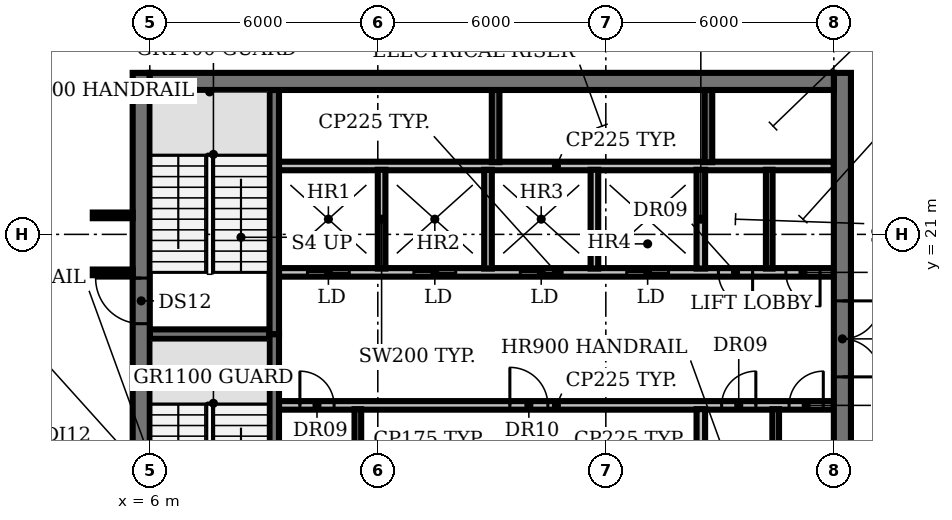
"""IFC4 building model, lengths in metres.
Left out: names, types, materials, properties, quantities, classifications, styles, units other than length and angle.
Written with IfcOpenShell. Run it as: python <this file> out.ifc"""

import sys

from ifc_helpers import new_model, si_unit, direction, frame, frame_2d, origin, place, context, subcontext, project, spatial, rectangle, extrude, element, fill, save


model = new_model("IFC4")
c1 = context("Model", 3, precision=1e-05, world=origin(), true_north=direction((0.0, 1.0)))
c2 = subcontext(c1, "Body", "Model", "MODEL_VIEW")
j1 = project(units=[si_unit("LENGTHUNIT", "METRE"), si_unit("PLANEANGLEUNIT", "RADIAN")], contexts=[c1])
p1 = place(None, origin())
s1 = spatial("IfcSite", under=j1, at=p1, CompositionType="ELEMENT")
p2 = place(p1, origin())
s2 = spatial("IfcBuilding", under=s1, at=p2, CompositionType="ELEMENT")
p3 = place(p2, frame((0.0, 0.0, 209.6)))
s3 = spatial("IfcBuildingStorey", under=s2, at=p3, CompositionType="ELEMENT", Elevation=209.6)
p4 = place(p3, frame((9.4, 16.5, 0.0), z_axis=(0.0, 0.0, 1.0), x_axis=(1.0, 0.0, 0.0)))
e1 = element("IfcWall", 1, at=p4, inside=s3, PredefinedType="PARTITIONING", context=c2, shape_type="SweptSolid", body=[
    extrude(rectangle(XDim=14.6, YDim=0.225, at=frame_2d((7.3, 0.0))), origin(), (0.0, 0.0, 1.0), 3.8),
])
p5 = place(p4, frame((0.55, 0.0, 0.0)))
e2 = element("IfcOpeningElement", 2, at=p5, cuts=e1, PredefinedType="OPENING", context=c2, shape_type="SweptSolid", body=[
    extrude(rectangle(XDim=0.9, YDim=2.1, at=frame_2d((0.45, 1.05))), frame((0.0, 0.123, 0.0), z_axis=(0.0, -1.0, 0.0), x_axis=(1.0, 0.0, 0.0)), (0.0, 0.0, 1.0), 0.245),
])
p6 = place(p4, frame((6.075, 0.0, 0.0)))
e3 = element("IfcOpeningElement", 3, at=p6, cuts=e1, PredefinedType="OPENING", context=c2, shape_type="SweptSolid", body=[
    extrude(rectangle(XDim=1.0, YDim=2.1, at=frame_2d((0.5, 1.05))), frame((0.0, 0.123, 0.0), z_axis=(0.0, -1.0, 0.0), x_axis=(1.0, 0.0, 0.0)), (0.0, 0.0, 1.0), 0.245),
])
p7 = place(p4, frame((11.647, 0.0, 0.0)))
e4 = element("IfcOpeningElement", 4, at=p7, cuts=e1, PredefinedType="OPENING", context=c2, shape_type="SweptSolid", body=[
    extrude(rectangle(XDim=0.9, YDim=2.1, at=frame_2d((0.45, 1.05))), frame((0.0, 0.123, 0.0), z_axis=(0.0, -1.0, 0.0), x_axis=(1.0, 0.0, 0.0)), (0.0, 0.0, 1.0), 0.245),
])
p8 = place(p4, frame((13.423, 0.0, 0.0)))
e5 = element("IfcOpeningElement", 5, at=p8, cuts=e1, PredefinedType="OPENING", context=c2, shape_type="SweptSolid", body=[
    extrude(rectangle(XDim=0.9, YDim=2.1, at=frame_2d((0.45, 1.05))), frame((0.0, 0.123, 0.0), z_axis=(0.0, -1.0, 0.0), x_axis=(1.0, 0.0, 0.0)), (0.0, 0.0, 1.0), 0.245),
])
p9 = place(p3, frame((6.0, 18.375, 0.0), z_axis=(0.0, 0.0, 1.0), x_axis=(1.0, 0.0, 0.0)))
e6 = element("IfcWall", 6, at=p9, inside=s3, PredefinedType="SHEAR", context=c2, shape_type="SweptSolid", body=[
    extrude(rectangle(XDim=3.15, YDim=0.25, at=frame_2d((1.575, 0.0))), origin(), (0.0, 0.0, 1.0), 3.8),
])
p10 = place(p3, frame((24.0, 20.0, 0.0), z_axis=(0.0, 0.0, 1.0), x_axis=(-1.0, 0.0, 0.0)))
e7 = element("IfcWall", 7, at=p10, inside=s3, PredefinedType="PARTITIONING", context=c2, shape_type="SweptSolid", body=[
    extrude(rectangle(XDim=14.6, YDim=0.225, at=frame_2d((7.3, 0.0))), origin(), (0.0, 0.0, 1.0), 3.8),
])
p11 = place(p10, frame((12.75, 0.0, 0.0)))
e8 = element("IfcOpeningElement", 8, at=p11, cuts=e7, PredefinedType="OPENING", context=c2, shape_type="SweptSolid", body=[
    extrude(rectangle(XDim=1.1, YDim=2.1, at=frame_2d((0.55, 1.05))), frame((0.0, 0.123, 0.0), z_axis=(0.0, -1.0, 0.0), x_axis=(1.0, 0.0, 0.0)), (0.0, 0.0, 1.0), 0.245),
])
p12 = place(p10, frame((9.95, 0.0, 0.0)))
e9 = element("IfcOpeningElement", 9, at=p12, cuts=e7, PredefinedType="OPENING", context=c2, shape_type="SweptSolid", body=[
    extrude(rectangle(XDim=1.1, YDim=2.1, at=frame_2d((0.55, 1.05))), frame((0.0, 0.123, 0.0), z_axis=(0.0, -1.0, 0.0), x_axis=(1.0, 0.0, 0.0)), (0.0, 0.0, 1.0), 0.245),
])
p13 = place(p10, frame((7.15, 0.0, 0.0)))
e10 = element("IfcOpeningElement", 10, at=p13, cuts=e7, PredefinedType="OPENING", context=c2, shape_type="SweptSolid", body=[
    extrude(rectangle(XDim=1.1, YDim=2.1, at=frame_2d((0.55, 1.05))), frame((0.0, 0.123, 0.0), z_axis=(0.0, -1.0, 0.0), x_axis=(1.0, 0.0, 0.0)), (0.0, 0.0, 1.0), 0.245),
])
p14 = place(p10, frame((4.35, 0.0, 0.0)))
e11 = element("IfcOpeningElement", 11, at=p14, cuts=e7, PredefinedType="OPENING", context=c2, shape_type="SweptSolid", body=[
    extrude(rectangle(XDim=1.1, YDim=2.1, at=frame_2d((0.55, 1.05))), frame((0.0, 0.123, 0.0), z_axis=(0.0, -1.0, 0.0), x_axis=(1.0, 0.0, 0.0)), (0.0, 0.0, 1.0), 0.245),
])
p15 = place(p10, frame((2.137, 0.0, 0.0)))
e12 = element("IfcOpeningElement", 12, at=p15, cuts=e7, PredefinedType="OPENING", context=c2, shape_type="SweptSolid", body=[
    extrude(rectangle(XDim=0.9, YDim=2.1, at=frame_2d((0.45, 1.05))), frame((0.0, 0.123, 0.0), z_axis=(0.0, -1.0, 0.0), x_axis=(1.0, 0.0, 0.0)), (0.0, 0.0, 1.0), 0.245),
])
p16 = place(p10, frame((0.363, 0.0, 0.0)))
e13 = element("IfcOpeningElement", 13, at=p16, cuts=e7, PredefinedType="OPENING", context=c2, shape_type="SweptSolid", body=[
    extrude(rectangle(XDim=0.9, YDim=2.1, at=frame_2d((0.45, 1.05))), frame((0.0, 0.123, 0.0), z_axis=(0.0, -1.0, 0.0), x_axis=(1.0, 0.0, 0.0)), (0.0, 0.0, 1.0), 0.245),
])
p17 = place(p3, frame((9.4, 22.8, 0.0), z_axis=(0.0, 0.0, 1.0), x_axis=(1.0, 0.0, 0.0)))
e14 = element("IfcWall", 14, at=p17, inside=s3, PredefinedType="PARTITIONING", context=c2, shape_type="SweptSolid", body=[
    extrude(rectangle(XDim=14.6, YDim=0.225, at=frame_2d((7.3, 0.0))), origin(), (0.0, 0.0, 1.0), 3.8),
])
p18 = place(p3, frame((9.275, 18.375, 0.0), z_axis=(0.0, 0.0, 1.0), x_axis=(0.0, -1.0, 0.0)))
e15 = element("IfcWall", 15, at=p18, inside=s3, PredefinedType="SHEAR", context=c2, shape_type="SweptSolid", body=[
    extrude(rectangle(XDim=6.55, YDim=0.25, at=frame_2d((3.275, 0.0))), origin(), (0.0, 0.0, 1.0), 3.8),
])
p19 = place(p18, frame((5.075, 0.0, 0.0)))
e16 = element("IfcOpeningElement", 16, at=p19, cuts=e15, PredefinedType="OPENING", context=c2, shape_type="SweptSolid", body=[
    extrude(rectangle(XDim=1.0, YDim=2.1, at=frame_2d((0.5, 1.05))), frame((0.0, 0.135, 0.0), z_axis=(0.0, -1.0, 0.0), x_axis=(1.0, 0.0, 0.0)), (0.0, 0.0, 1.0), 0.27),
])
p20 = place(p3, frame((9.275, 18.375, 0.0), z_axis=(0.0, 0.0, 1.0), x_axis=(0.0, 1.0, 0.0)))
e17 = element("IfcWall", 17, at=p20, inside=s3, PredefinedType="SHEAR", context=c2, shape_type="SweptSolid", body=[
    extrude(rectangle(XDim=6.425, YDim=0.25, at=frame_2d((3.212, 0.0))), origin(), (0.0, 0.0, 1.0), 3.8),
])
p21 = place(p3, frame((11.475, 13.8, 0.0), z_axis=(0.0, 0.0, 1.0), x_axis=(0.0, 1.0, 0.0)))
e18 = element("IfcWall", 18, at=p21, inside=s3, PredefinedType="PARTITIONING", context=c2, shape_type="SweptSolid", body=[
    extrude(rectangle(XDim=2.6, YDim=0.175, at=frame_2d((1.3, 0.0))), origin(), (0.0, 0.0, 1.0), 3.8),
])
for number, where, z_axis, x_axis in (
    (19, (12.1, 20.1, 0.0), (0.0, 0.0, 1.0), (0.0, 1.0, 0.0)),
    (20, (14.9, 20.1, 0.0), (0.0, 0.0, 1.0), (0.0, 1.0, 0.0)),
):
    element("IfcWall", number, at=place(p3, frame(where, z_axis=z_axis, x_axis=x_axis)), inside=s3, PredefinedType="SOLIDWALL", context=c2, shape_type="SweptSolid", body=[
        extrude(rectangle(XDim=2.6, YDim=0.2, at=frame_2d((1.3, 0.0))), origin(), (0.0, 0.0, 1.0), 3.8),
    ])
p22 = place(p3, frame((15.1, 22.9, 0.0), z_axis=(0.0, 0.0, 1.0), x_axis=(0.0, 1.0, 0.0)))
e21 = element("IfcWall", 21, at=p22, inside=s3, PredefinedType="SHEAR", context=c2, shape_type="SweptSolid", body=[
    extrude(rectangle(XDim=1.9, YDim=0.2, at=frame_2d((0.95, 0.0))), origin(), (0.0, 0.0, 1.0), 3.8),
])
p23 = place(p3, frame((17.7, 20.1, 0.0), z_axis=(0.0, 0.0, 1.0), x_axis=(0.0, 1.0, 0.0)))
e22 = element("IfcWall", 22, at=p23, inside=s3, PredefinedType="SOLIDWALL", context=c2, shape_type="SweptSolid", body=[
    extrude(rectangle(XDim=2.6, YDim=0.2, at=frame_2d((1.3, 0.0))), origin(), (0.0, 0.0, 1.0), 3.8),
])
for number, where, z_axis, x_axis in (
    (23, (20.5, 13.8, 0.0), (0.0, 0.0, 1.0), (0.0, 1.0, 0.0)),
    (24, (20.5, 20.1, 0.0), (0.0, 0.0, 1.0), (0.0, 1.0, 0.0)),
):
    element("IfcWall", number, at=place(p3, frame(where, z_axis=z_axis, x_axis=x_axis)), inside=s3, PredefinedType="PARTITIONING", context=c2, shape_type="SweptSolid", body=[
        extrude(rectangle(XDim=2.6, YDim=0.225, at=frame_2d((1.3, 0.0))), origin(), (0.0, 0.0, 1.0), 3.8),
    ])
p24 = place(p3, frame((20.7, 22.9, 0.0), z_axis=(0.0, 0.0, 1.0), x_axis=(0.0, 1.0, 0.0)))
e25 = element("IfcWall", 25, at=p24, inside=s3, PredefinedType="SHEAR", context=c2, shape_type="SweptSolid", body=[
    extrude(rectangle(XDim=1.9, YDim=0.2, at=frame_2d((0.95, 0.0))), origin(), (0.0, 0.0, 1.0), 3.8),
])
for number, where, z_axis, x_axis in (
    (26, (22.3, 20.1, 0.0), (0.0, 0.0, 1.0), (0.0, 1.0, 0.0)),
    (27, (22.47, 13.8, 0.0), (0.0, 0.0, 1.0), (0.0, 1.0, 0.0)),
):
    element("IfcWall", number, at=place(p3, frame(where, z_axis=z_axis, x_axis=x_axis)), inside=s3, PredefinedType="PARTITIONING", context=c2, shape_type="SweptSolid", body=[
        extrude(rectangle(XDim=2.6, YDim=0.175, at=frame_2d((1.3, 0.0))), origin(), (0.0, 0.0, 1.0), 3.8),
    ])
p25 = place(p3, frame((5.775, 4.42, 0.0), z_axis=(0.0, 0.0, 1.0), x_axis=(0.0, 1.0, 0.0)))
e28 = element("IfcWall", 28, at=p25, inside=s3, PredefinedType="SHEAR", context=c2, shape_type="SweptSolid", body=[
    extrude(rectangle(XDim=20.83, YDim=0.45, at=frame_2d((10.415, 0.0))), origin(), (0.0, 0.0, 1.0), 3.8),
])
p26 = place(p25, frame((1.23, 0.0, 0.0)))
e29 = element("IfcOpeningElement", 29, at=p26, cuts=e28, PredefinedType="OPENING", context=c2, shape_type="SweptSolid", body=[
    extrude(rectangle(XDim=1.5, YDim=2.1, at=frame_2d((0.75, 1.05))), frame((0.0, 0.235, 0.0), z_axis=(0.0, -1.0, 0.0), x_axis=(1.0, 0.0, 0.0)), (0.0, 0.0, 1.0), 0.47),
])
p27 = place(p25, frame((7.68, 0.0, 0.0)))
e30 = element("IfcOpeningElement", 30, at=p27, cuts=e28, PredefinedType="OPENING", context=c2, shape_type="SweptSolid", body=[
    extrude(rectangle(XDim=1.2, YDim=2.1, at=frame_2d((0.6, 1.05))), frame((0.0, 0.235, 0.0), z_axis=(0.0, -1.0, 0.0), x_axis=(1.0, 0.0, 0.0)), (0.0, 0.0, 1.0), 0.47),
])
p28 = place(p25, frame((14.23, 0.0, 0.0)))
e31 = element("IfcOpeningElement", 31, at=p28, cuts=e28, PredefinedType="OPENING", context=c2, shape_type="SweptSolid", body=[
    extrude(rectangle(XDim=1.2, YDim=2.1, at=frame_2d((0.6, 1.05))), frame((0.0, 0.235, 0.0), z_axis=(0.0, -1.0, 0.0), x_axis=(1.0, 0.0, 0.0)), (0.0, 0.0, 1.0), 0.47),
])
p29 = place(p3, frame((24.225, 25.25, 0.0), z_axis=(0.0, 0.0, 1.0), x_axis=(0.0, -1.0, 0.0)))
e32 = element("IfcWall", 32, at=p29, inside=s3, PredefinedType="SHEAR", context=c2, shape_type="SweptSolid", body=[
    extrude(rectangle(XDim=20.83, YDim=0.45, at=frame_2d((10.415, 0.0))), origin(), (0.0, 0.0, 1.0), 3.8),
])
p30 = place(p29, frame((18.1, 0.0, 0.0)))
e33 = element("IfcOpeningElement", 33, at=p30, cuts=e32, PredefinedType="OPENING", context=c2, shape_type="SweptSolid", body=[
    extrude(rectangle(XDim=1.5, YDim=2.1, at=frame_2d((0.75, 1.05))), frame((0.0, 0.235, 0.0), z_axis=(0.0, -1.0, 0.0), x_axis=(1.0, 0.0, 0.0)), (0.0, 0.0, 1.0), 0.47),
])
p31 = place(p29, frame((12.0, 0.0, 0.0)))
e34 = element("IfcOpeningElement", 34, at=p31, cuts=e32, PredefinedType="OPENING", context=c2, shape_type="SweptSolid", body=[
    extrude(rectangle(XDim=0.9, YDim=2.1, at=frame_2d((0.45, 1.05))), frame((0.0, 0.235, 0.0), z_axis=(0.0, -1.0, 0.0), x_axis=(1.0, 0.0, 0.0)), (0.0, 0.0, 1.0), 0.47),
])
p32 = place(p29, frame((6.0, 0.0, 0.0)))
e35 = element("IfcOpeningElement", 35, at=p32, cuts=e32, PredefinedType="OPENING", context=c2, shape_type="SweptSolid", body=[
    extrude(rectangle(XDim=2.0, YDim=2.1, at=frame_2d((1.0, 1.05))), frame((0.0, 0.235, 0.0), z_axis=(0.0, -1.0, 0.0), x_axis=(1.0, 0.0, 0.0)), (0.0, 0.0, 1.0), 0.47),
])
p33 = place(p3, frame((6.0, 25.025, 0.0), z_axis=(0.0, 0.0, 1.0), x_axis=(1.0, 0.0, 0.0)))
e36 = element("IfcWall", 36, at=p33, inside=s3, PredefinedType="SHEAR", context=c2, shape_type="SweptSolid", body=[
    extrude(rectangle(XDim=18.0, YDim=0.45, at=frame_2d((9.0, 0.0))), origin(), (0.0, 0.0, 1.0), 3.8),
])
for number, where, z_axis, x_axis in (
    (37, (4.5, 20.0, 0.0), (0.0, 0.0, 1.0), (1.0, 0.0, 0.0)),
    (38, (4.5, 21.5, 0.0), (0.0, 0.0, 1.0), (1.0, 0.0, 0.0)),
):
    element("IfcWall", number, at=place(p3, frame(where, z_axis=z_axis, x_axis=x_axis)), inside=s3, PredefinedType="PARTITIONING", context=c2, shape_type="SweptSolid", body=[
        extrude(rectangle(XDim=1.05, YDim=0.15, at=frame_2d((0.525, 0.0))), origin(), (0.0, 0.0, 1.0), 2.83),
    ])
p34 = place(p5, origin())
e39 = element("IfcDoor", 39, at=p34, inside=s3, OperationType="SINGLE_SWING_LEFT", PredefinedType="DOOR", context=c2, shape_type="SweptSolid", body=[
    extrude(rectangle(XDim=0.9, YDim=2.1, at=frame_2d((0.45, 1.05))), frame((0.0, 0.025, 0.0), z_axis=(0.0, -1.0, 0.0), x_axis=(1.0, 0.0, 0.0)), (0.0, 0.0, 1.0), 0.05),
])
fill(e2, e39)
p35 = place(p6, origin())
e40 = element("IfcDoor", 40, at=p35, inside=s3, OperationType="SINGLE_SWING_LEFT", PredefinedType="DOOR", context=c2, shape_type="SweptSolid", body=[
    extrude(rectangle(XDim=1.0, YDim=2.1, at=frame_2d((0.5, 1.05))), frame((0.0, 0.025, 0.0), z_axis=(0.0, -1.0, 0.0), x_axis=(1.0, 0.0, 0.0)), (0.0, 0.0, 1.0), 0.05),
])
fill(e3, e40)
p36 = place(p7, origin())
e41 = element("IfcDoor", 41, at=p36, inside=s3, OperationType="SINGLE_SWING_RIGHT", PredefinedType="DOOR", context=c2, shape_type="SweptSolid", body=[
    extrude(rectangle(XDim=0.9, YDim=2.1, at=frame_2d((0.45, 1.05))), frame((0.0, 0.025, 0.0), z_axis=(0.0, -1.0, 0.0), x_axis=(1.0, 0.0, 0.0)), (0.0, 0.0, 1.0), 0.05),
])
fill(e4, e41)
p37 = place(p8, origin())
e42 = element("IfcDoor", 42, at=p37, inside=s3, OperationType="SINGLE_SWING_RIGHT", PredefinedType="DOOR", context=c2, shape_type="SweptSolid", body=[
    extrude(rectangle(XDim=0.9, YDim=2.1, at=frame_2d((0.45, 1.05))), frame((0.0, 0.025, 0.0), z_axis=(0.0, -1.0, 0.0), x_axis=(1.0, 0.0, 0.0)), (0.0, 0.0, 1.0), 0.05),
])
fill(e5, e42)
p38 = place(p11, origin())
e43 = element("IfcDoor", 43, at=p38, inside=s3, OperationType="DOUBLE_DOOR_SLIDING", PredefinedType="DOOR", context=c2, shape_type="SweptSolid", body=[
    extrude(rectangle(XDim=1.1, YDim=2.1, at=frame_2d((0.55, 1.05))), frame((0.0, 0.025, 0.0), z_axis=(0.0, -1.0, 0.0), x_axis=(1.0, 0.0, 0.0)), (0.0, 0.0, 1.0), 0.05),
])
fill(e8, e43)
p39 = place(p12, origin())
e44 = element("IfcDoor", 44, at=p39, inside=s3, OperationType="DOUBLE_DOOR_SLIDING", PredefinedType="DOOR", context=c2, shape_type="SweptSolid", body=[
    extrude(rectangle(XDim=1.1, YDim=2.1, at=frame_2d((0.55, 1.05))), frame((0.0, 0.025, 0.0), z_axis=(0.0, -1.0, 0.0), x_axis=(1.0, 0.0, 0.0)), (0.0, 0.0, 1.0), 0.05),
])
fill(e9, e44)
p40 = place(p13, origin())
e45 = element("IfcDoor", 45, at=p40, inside=s3, OperationType="DOUBLE_DOOR_SLIDING", PredefinedType="DOOR", context=c2, shape_type="SweptSolid", body=[
    extrude(rectangle(XDim=1.1, YDim=2.1, at=frame_2d((0.55, 1.05))), frame((0.0, 0.025, 0.0), z_axis=(0.0, -1.0, 0.0), x_axis=(1.0, 0.0, 0.0)), (0.0, 0.0, 1.0), 0.05),
])
fill(e10, e45)
p41 = place(p14, origin())
e46 = element("IfcDoor", 46, at=p41, inside=s3, OperationType="DOUBLE_DOOR_SLIDING", PredefinedType="DOOR", context=c2, shape_type="SweptSolid", body=[
    extrude(rectangle(XDim=1.1, YDim=2.1, at=frame_2d((0.55, 1.05))), frame((0.0, 0.025, 0.0), z_axis=(0.0, -1.0, 0.0), x_axis=(1.0, 0.0, 0.0)), (0.0, 0.0, 1.0), 0.05),
])
fill(e11, e46)
p42 = place(p15, origin())
e47 = element("IfcDoor", 47, at=p42, inside=s3, OperationType="SINGLE_SWING_LEFT", PredefinedType="DOOR", context=c2, shape_type="SweptSolid", body=[
    extrude(rectangle(XDim=0.9, YDim=2.1, at=frame_2d((0.45, 1.05))), frame((0.0, 0.025, 0.0), z_axis=(0.0, -1.0, 0.0), x_axis=(1.0, 0.0, 0.0)), (0.0, 0.0, 1.0), 0.05),
])
fill(e12, e47)
p43 = place(p16, origin())
e48 = element("IfcDoor", 48, at=p43, inside=s3, OperationType="SINGLE_SWING_LEFT", PredefinedType="DOOR", context=c2, shape_type="SweptSolid", body=[
    extrude(rectangle(XDim=0.9, YDim=2.1, at=frame_2d((0.45, 1.05))), frame((0.0, 0.025, 0.0), z_axis=(0.0, -1.0, 0.0), x_axis=(1.0, 0.0, 0.0)), (0.0, 0.0, 1.0), 0.05),
])
fill(e13, e48)
p44 = place(p28, origin())
e49 = element("IfcDoor", 49, at=p44, inside=s3, OperationType="SINGLE_SWING_RIGHT", PredefinedType="DOOR", context=c2, shape_type="SweptSolid", body=[
    extrude(rectangle(XDim=1.2, YDim=2.1, at=frame_2d((0.6, 1.05))), frame((0.0, 0.025, 0.0), z_axis=(0.0, -1.0, 0.0), x_axis=(1.0, 0.0, 0.0)), (0.0, 0.0, 1.0), 0.05),
])
fill(e31, e49)
p45 = place(p32, origin())
e50 = element("IfcDoor", 50, at=p45, inside=s3, OperationType="DOUBLE_DOOR_SINGLE_SWING", PredefinedType="DOOR", context=c2, shape_type="SweptSolid", body=[
    extrude(rectangle(XDim=2.0, YDim=2.1, at=frame_2d((1.0, 1.05))), frame((0.0, 0.025, 0.0), z_axis=(0.0, -1.0, 0.0), x_axis=(1.0, 0.0, 0.0)), (0.0, 0.0, 1.0), 0.05),
])
fill(e35, e50)
save(model, sys.argv[1])
